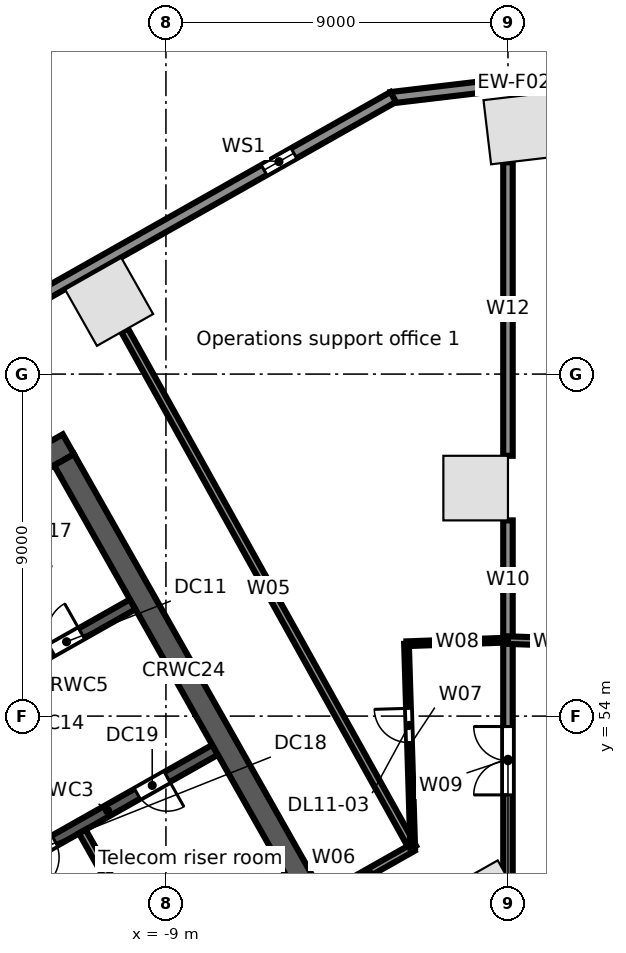
"""IFC4 building model, lengths in metres.
Left out: names, types, materials, properties, quantities, classifications, styles, units other than length and angle.
Written with IfcOpenShell. Run it as: python <this file> out.ifc"""

import sys

from ifc_helpers import new_model, si_unit, direction, frame, frame_2d, origin, origin_2d, place, context, subcontext, project, spatial, rectangle, extrude, element, fill, save


model = new_model("IFC4")
c1 = context("Model", 3, precision=1e-05, world=origin(), true_north=direction((0.0, 1.0)))
c2 = subcontext(c1, "Body", "Model", "MODEL_VIEW")
j1 = project(units=[si_unit("LENGTHUNIT", "METRE"), si_unit("PLANEANGLEUNIT", "RADIAN")], contexts=[c1])
p1 = place(None, origin())
s1 = spatial("IfcSite", under=j1, at=p1, CompositionType="ELEMENT")
p2 = place(p1, origin())
s2 = spatial("IfcBuilding", under=s1, at=p2, CompositionType="ELEMENT")
p3 = place(p2, frame((0.0, 0.0, 56.5)))
s3 = spatial("IfcBuildingStorey", under=s2, at=p3, CompositionType="ELEMENT", Elevation=56.5)
for number, where, z_axis, x_axis in (
    (1, (0.3, 69.464, 0.0), (0.0, 0.0, 1.0), (-0.993, -0.118, 0.0)),
    (2, (-10.495, 64.902, 0.0), (0.0, 0.0, 1.0), (-0.87, -0.492, 0.0)),
    (3, (-0.591, 49.044, 0.0), (0.0, 0.0, 1.0), (0.87, 0.492, 0.0)),
    (4, (-0.85, 60.0, 0.0), (0.0, 0.0, 1.0), (0.0, 1.0, 0.0)),
):
    element("IfcColumn", number, at=place(p3, frame(where, z_axis=z_axis, x_axis=x_axis)), inside=s3, PredefinedType="COLUMN", context=c2, shape_type="SweptSolid", body=[
        extrude(rectangle(XDim=1.7, YDim=1.7, at=origin_2d()), origin(), (0.0, 0.0, 1.0), 5.0),
    ])
p4 = place(p3, frame((-3.076, 70.273, 0.0), z_axis=(0.0, 0.0, 1.0), x_axis=(0.993067743007, 0.117543429416, 0.0)))
e5 = element("IfcWall", 5, at=p4, inside=s3, PredefinedType="STANDARD", context=c2, shape_type="SweptSolid", body=[
    extrude(rectangle(XDim=6.516, YDim=0.3, at=frame_2d((3.258, 0.0))), origin(), (0.0, 0.0, 1.0), 4.68),
])
p5 = place(p3, frame((-58.745, 38.764, 0.0), z_axis=(0.0, 0.0, 1.0), x_axis=(0.870355811726, 0.492423355453, 0.0)))
e6 = element("IfcWall", 6, at=p5, inside=s3, PredefinedType="STANDARD", context=c2, shape_type="SweptSolid", body=[
    extrude(rectangle(XDim=64.025, YDim=0.3, at=frame_2d((32.013, 0.0))), origin(), (0.0, 0.0, 1.0), 4.68),
])
p6 = place(p5, frame((60.122, 0.0, 0.6)))
e7 = element("IfcOpeningElement", 7, at=p6, cuts=e6, PredefinedType="OPENING", context=c2, shape_type="SweptSolid", body=[
    extrude(rectangle(XDim=0.9, YDim=3.2, at=frame_2d((0.45, 1.6))), frame((0.0, 0.16, 0.0), z_axis=(0.0, -1.0, 0.0), x_axis=(1.0, 0.0, 0.0)), (0.0, 0.0, 1.0), 0.32),
])
p7 = place(p5, frame((50.992, 0.0, 0.6)))
e8 = element("IfcOpeningElement", 8, at=p7, cuts=e6, PredefinedType="OPENING", context=c2, shape_type="SweptSolid", body=[
    extrude(rectangle(XDim=0.9, YDim=3.2, at=frame_2d((0.45, 1.6))), frame((0.0, 0.16, 0.0), z_axis=(0.0, -1.0, 0.0), x_axis=(1.0, 0.0, 0.0)), (0.0, 0.0, 1.0), 0.32),
])
p8 = place(p5, frame((41.862, 0.0, 0.6)))
e9 = element("IfcOpeningElement", 9, at=p8, cuts=e6, PredefinedType="OPENING", context=c2, shape_type="SweptSolid", body=[
    extrude(rectangle(XDim=0.9, YDim=3.2, at=frame_2d((0.45, 1.6))), frame((0.0, 0.16, 0.0), z_axis=(0.0, -1.0, 0.0), x_axis=(1.0, 0.0, 0.0)), (0.0, 0.0, 1.0), 0.32),
])
p9 = place(p5, frame((32.732, 0.0, 0.6)))
e10 = element("IfcOpeningElement", 10, at=p9, cuts=e6, PredefinedType="OPENING", context=c2, shape_type="SweptSolid", body=[
    extrude(rectangle(XDim=0.9, YDim=3.2, at=frame_2d((0.45, 1.6))), frame((0.0, 0.16, 0.0), z_axis=(0.0, -1.0, 0.0), x_axis=(1.0, 0.0, 0.0)), (0.0, 0.0, 1.0), 0.32),
])
p10 = place(p5, frame((23.602, 0.0, 0.6)))
e11 = element("IfcOpeningElement", 11, at=p10, cuts=e6, PredefinedType="OPENING", context=c2, shape_type="SweptSolid", body=[
    extrude(rectangle(XDim=0.9, YDim=3.2, at=frame_2d((0.45, 1.6))), frame((0.0, 0.16, 0.0), z_axis=(0.0, -1.0, 0.0), x_axis=(1.0, 0.0, 0.0)), (0.0, 0.0, 1.0), 0.32),
])
p11 = place(p5, frame((14.472, 0.0, 0.6)))
e12 = element("IfcOpeningElement", 12, at=p11, cuts=e6, PredefinedType="OPENING", context=c2, shape_type="SweptSolid", body=[
    extrude(rectangle(XDim=0.9, YDim=3.2, at=frame_2d((0.45, 1.6))), frame((0.0, 0.16, 0.0), z_axis=(0.0, -1.0, 0.0), x_axis=(1.0, 0.0, 0.0)), (0.0, 0.0, 1.0), 0.32),
])
p12 = place(p5, frame((5.342, 0.0, 0.6)))
e13 = element("IfcOpeningElement", 13, at=p12, cuts=e6, PredefinedType="OPENING", context=c2, shape_type="SweptSolid", body=[
    extrude(rectangle(XDim=0.9, YDim=3.2, at=frame_2d((0.45, 1.6))), frame((0.0, 0.16, 0.0), z_axis=(0.0, -1.0, 0.0), x_axis=(1.0, 0.0, 0.0)), (0.0, 0.0, 1.0), 0.32),
])
p13 = place(p3, frame((-13.365, 49.911, 0.0), z_axis=(0.0, 0.0, 1.0), x_axis=(0.870340995471, 0.49244954219, 0.0)))
e14 = element("IfcWall", 14, at=p13, inside=s3, PredefinedType="SOLIDWALL", context=c2, shape_type="SweptSolid", body=[
    extrude(rectangle(XDim=6.5, YDim=0.3, at=frame_2d((3.25, 0.0))), origin(), (0.0, 0.0, 1.0), 4.68),
])
p14 = place(p13, frame((0.75, 0.0, 0.0)))
e15 = element("IfcOpeningElement", 15, at=p14, cuts=e14, PredefinedType="OPENING", context=c2, shape_type="SweptSolid", body=[
    extrude(rectangle(XDim=0.9, YDim=2.1, at=frame_2d((0.45, 1.05))), frame((0.0, 0.16, 0.0), z_axis=(0.0, -1.0, 0.0), x_axis=(1.0, 0.0, 0.0)), (0.0, 0.0, 1.0), 0.32),
])
p15 = place(p13, frame((4.15, 0.0, 0.0)))
e16 = element("IfcOpeningElement", 16, at=p15, cuts=e14, PredefinedType="OPENING", context=c2, shape_type="SweptSolid", body=[
    extrude(rectangle(XDim=0.9, YDim=2.1, at=frame_2d((0.45, 1.05))), frame((0.0, 0.16, 0.0), z_axis=(0.0, -1.0, 0.0), x_axis=(1.0, 0.0, 0.0)), (0.0, 0.0, 1.0), 0.32),
])
p16 = place(p3, frame((-15.618, 53.691, 0.0), z_axis=(0.0, 0.0, 1.0), x_axis=(0.870356769198, 0.492421663121, 0.0)))
e17 = element("IfcWall", 17, at=p16, inside=s3, PredefinedType="SOLIDWALL", context=c2, shape_type="SweptSolid", body=[
    extrude(rectangle(XDim=6.6, YDim=0.3, at=frame_2d((3.3, 0.0))), origin(), (0.0, 0.0, 1.0), 4.68),
])
p17 = place(p16, frame((0.7, 0.0, 0.0)))
e18 = element("IfcOpeningElement", 18, at=p17, cuts=e17, PredefinedType="OPENING", context=c2, shape_type="SweptSolid", body=[
    extrude(rectangle(XDim=0.9, YDim=2.1, at=frame_2d((0.45, 1.05))), frame((0.0, 0.16, 0.0), z_axis=(0.0, -1.0, 0.0), x_axis=(1.0, 0.0, 0.0)), (0.0, 0.0, 1.0), 0.32),
])
p18 = place(p16, frame((4.15, 0.0, 0.0)))
e19 = element("IfcOpeningElement", 19, at=p18, cuts=e17, PredefinedType="OPENING", context=c2, shape_type="SweptSolid", body=[
    extrude(rectangle(XDim=0.9, YDim=2.1, at=frame_2d((0.45, 1.05))), frame((0.0, 0.16, 0.0), z_axis=(0.0, -1.0, 0.0), x_axis=(1.0, 0.0, 0.0)), (0.0, 0.0, 1.0), 0.32),
])
p19 = place(p3, frame((-24.623, 53.767, 0.0), z_axis=(0.0, 0.0, 1.0), x_axis=(0.870356627484, 0.492421913601, 0.0)))
e20 = element("IfcWall", 20, at=p19, inside=s3, PredefinedType="SOLIDWALL", context=c2, shape_type="SweptSolid", body=[
    extrude(rectangle(XDim=15.0, YDim=0.6, at=frame_2d((7.5, 0.0))), origin(), (0.0, 0.0, 1.0), 4.68),
])
p20 = place(p3, frame((-11.202, 50.962, 0.0), z_axis=(0.0, 0.0, 1.0), x_axis=(0.49241474071, -0.870360685654, 0.0)))
e21 = element("IfcWall", 21, at=p20, inside=s3, PredefinedType="PARTITIONING", context=c2, shape_type="SweptSolid", body=[
    extrude(rectangle(XDim=4.05, YDim=0.2, at=frame_2d((2.025, 0.0))), origin(), (0.0, 0.0, 1.0), 4.68),
])
p21 = place(p3, frame((-11.681, 60.744, 0.0), z_axis=(0.0, 0.0, 1.0), x_axis=(0.492426772896, -0.870353878221, 0.0)))
e22 = element("IfcWall", 22, at=p21, inside=s3, PredefinedType="SOLIDWALL", context=c2, shape_type="SweptSolid", body=[
    extrude(rectangle(XDim=12.8, YDim=0.6, at=frame_2d((6.4, 0.0))), origin(), (0.0, 0.0, 1.0), 4.68),
])
p22 = place(p3, frame((-10.088, 64.155, 0.0), z_axis=(0.0, 0.0, 1.0), x_axis=(0.486446127767, -0.873710572661, 0.0)))
e23 = element("IfcWall", 23, at=p22, inside=s3, PredefinedType="PARTITIONING", context=c2, shape_type="SweptSolid", body=[
    extrude(rectangle(XDim=15.584, YDim=0.2, at=frame_2d((7.792, 0.0))), origin(), (0.0, 0.0, 1.0), 3.76),
])
p23 = place(p3, frame((-4.821, 49.23, 0.0), z_axis=(0.0, 0.0, 1.0), x_axis=(0.870371217631, 0.492396124598, 0.0)))
e24 = element("IfcWall", 24, at=p23, inside=s3, PredefinedType="PARTITIONING", context=c2, shape_type="SweptSolid", body=[
    extrude(rectangle(XDim=2.659, YDim=0.2, at=frame_2d((1.329, 0.0))), origin(), (0.0, 0.0, 1.0), 4.68),
])
p24 = place(p3, frame((-2.67, 55.904, 0.0), z_axis=(0.0, 0.0, 1.0), x_axis=(0.030338701418, -0.999539675649, 0.0)))
e25 = element("IfcWall", 25, at=p24, inside=s3, PredefinedType="PARTITIONING", context=c2, shape_type="SweptSolid", body=[
    extrude(rectangle(XDim=5.367, YDim=0.125, at=frame_2d((2.684, 0.0))), origin(), (0.0, 0.0, 1.0), 4.68),
])
p25 = place(p24, frame((1.7, 0.0, 0.0)))
e26 = element("IfcOpeningElement", 26, at=p25, cuts=e25, PredefinedType="OPENING", context=c2, shape_type="SweptSolid", body=[
    extrude(rectangle(XDim=0.9, YDim=2.1, at=frame_2d((0.45, 1.05))), frame((0.0, 0.073, 0.0), z_axis=(0.0, -1.0, 0.0), x_axis=(1.0, 0.0, 0.0)), (0.0, 0.0, 1.0), 0.145),
])
p26 = place(p3, frame((-2.67, 55.904, 0.0), z_axis=(0.0, 0.0, 1.0), x_axis=(0.999354913865, 0.03591317494, 0.0)))
e27 = element("IfcWall", 27, at=p26, inside=s3, PredefinedType="PARTITIONING", context=c2, shape_type="SweptSolid", body=[
    extrude(rectangle(XDim=2.672, YDim=0.125, at=frame_2d((1.336, 0.0))), origin(), (0.0, 0.0, 1.0), 3.742),
])
p27 = place(p3, frame((0.0, 49.726, 0.0), z_axis=(0.0, 0.0, 1.0), x_axis=(0.0, 1.0, 0.0)))
e28 = element("IfcWall", 28, at=p27, inside=s3, PredefinedType="PARTITIONING", context=c2, shape_type="SweptSolid", body=[
    extrude(rectangle(XDim=6.274, YDim=0.25, at=frame_2d((3.137, 0.0))), origin(), (0.0, 0.0, 1.0), 4.68),
])
p28 = place(p27, frame((2.2, 0.0, 0.0)))
e29 = element("IfcOpeningElement", 29, at=p28, cuts=e28, PredefinedType="OPENING", context=c2, shape_type="SweptSolid", body=[
    extrude(rectangle(XDim=1.8, YDim=2.1, at=frame_2d((0.9, 1.05))), frame((0.0, 0.135, 0.0), z_axis=(0.0, -1.0, 0.0), x_axis=(1.0, 0.0, 0.0)), (0.0, 0.0, 1.0), 0.27),
])
p29 = place(p3, frame((0.0, 56.0, 0.0), z_axis=(0.0, 0.0, 1.0), x_axis=(0.0, 1.0, 0.0)))
e30 = element("IfcWall", 30, at=p29, inside=s3, PredefinedType="PARTITIONING", context=c2, shape_type="SweptSolid", body=[
    extrude(rectangle(XDim=3.15, YDim=0.25, at=frame_2d((1.575, 0.0))), origin(), (0.0, 0.0, 1.0), 4.68),
])
p30 = place(p3, frame((0.0, 56.0, 0.0), z_axis=(0.0, 0.0, 1.0), x_axis=(0.999349313684, -0.036068673934, 0.0)))
e31 = element("IfcWall", 31, at=p30, inside=s3, PredefinedType="PARTITIONING", context=c2, shape_type="SweptSolid", body=[
    extrude(rectangle(XDim=2.471, YDim=0.2, at=frame_2d((1.235, 0.0))), origin(), (0.0, 0.0, 1.0), 4.68),
])
p31 = place(p3, frame((0.0, 60.85, 0.0), z_axis=(0.0, 0.0, 1.0), x_axis=(0.0, 1.0, 0.0)))
e32 = element("IfcWall", 32, at=p31, inside=s3, PredefinedType="PARTITIONING", context=c2, shape_type="SweptSolid", body=[
    extrude(rectangle(XDim=7.723, YDim=0.25, at=frame_2d((3.861, 0.0))), origin(), (0.0, 0.0, 1.0), 3.952),
])
p32 = place(p6, origin())
e33 = element("IfcWindow", 33, at=p32, inside=s3, PartitioningType="SINGLE_PANEL", PredefinedType="WINDOW", context=c2, shape_type="SweptSolid", body=[
    extrude(rectangle(XDim=0.9, YDim=3.2, at=frame_2d((0.45, 1.6))), frame((0.0, 0.03, 0.0), z_axis=(0.0, -1.0, 0.0), x_axis=(1.0, 0.0, 0.0)), (0.0, 0.0, 1.0), 0.06),
])
fill(e7, e33)
p33 = place(p18, origin())
e34 = element("IfcDoor", 34, at=p33, inside=s3, OperationType="SINGLE_SWING_RIGHT", PredefinedType="DOOR", context=c2, shape_type="SweptSolid", body=[
    extrude(rectangle(XDim=0.9, YDim=2.1, at=frame_2d((0.45, 1.05))), frame((0.0, 0.025, 0.0), z_axis=(0.0, -1.0, 0.0), x_axis=(1.0, 0.0, 0.0)), (0.0, 0.0, 1.0), 0.05),
])
fill(e19, e34)
p34 = place(p14, frame((0.9, 0.0, 0.0), z_axis=(0.0, 0.0, 1.0), x_axis=(-1.0, 0.0, 0.0)))
e35 = element("IfcDoor", 35, at=p34, inside=s3, OperationType="SINGLE_SWING_RIGHT", PredefinedType="DOOR", context=c2, shape_type="SweptSolid", body=[
    extrude(rectangle(XDim=0.9, YDim=2.1, at=frame_2d((0.45, 1.05))), frame((0.0, 0.025, 0.0), z_axis=(0.0, -1.0, 0.0), x_axis=(1.0, 0.0, 0.0)), (0.0, 0.0, 1.0), 0.05),
])
fill(e15, e35)
p35 = place(p15, frame((0.9, 0.0, 0.0), z_axis=(0.0, 0.0, 1.0), x_axis=(-1.0, 0.0, 0.0)))
e36 = element("IfcDoor", 36, at=p35, inside=s3, OperationType="SINGLE_SWING_LEFT", PredefinedType="DOOR", context=c2, shape_type="SweptSolid", body=[
    extrude(rectangle(XDim=0.9, YDim=2.1, at=frame_2d((0.45, 1.05))), frame((0.0, 0.025, 0.0), z_axis=(0.0, -1.0, 0.0), x_axis=(1.0, 0.0, 0.0)), (0.0, 0.0, 1.0), 0.05),
])
fill(e16, e36)
p36 = place(p25, frame((0.9, 0.0, 0.0), z_axis=(0.0, 0.0, 1.0), x_axis=(-1.0, 0.0, 0.0)))
e37 = element("IfcDoor", 37, at=p36, inside=s3, OperationType="SINGLE_SWING_RIGHT", PredefinedType="DOOR", context=c2, shape_type="SweptSolid", body=[
    extrude(rectangle(XDim=0.9, YDim=2.1, at=frame_2d((0.45, 1.05))), frame((0.0, 0.025, 0.0), z_axis=(0.0, -1.0, 0.0), x_axis=(1.0, 0.0, 0.0)), (0.0, 0.0, 1.0), 0.05),
])
fill(e26, e37)
p37 = place(p28, origin())
e38 = element("IfcDoor", 38, at=p37, inside=s3, OperationType="DOUBLE_DOOR_SINGLE_SWING", PredefinedType="DOOR", context=c2, shape_type="SweptSolid", body=[
    extrude(rectangle(XDim=1.8, YDim=2.1, at=frame_2d((0.9, 1.05))), frame((0.0, 0.025, 0.0), z_axis=(0.0, -1.0, 0.0), x_axis=(1.0, 0.0, 0.0)), (0.0, 0.0, 1.0), 0.05),
])
fill(e29, e38)
save(model, sys.argv[1])
